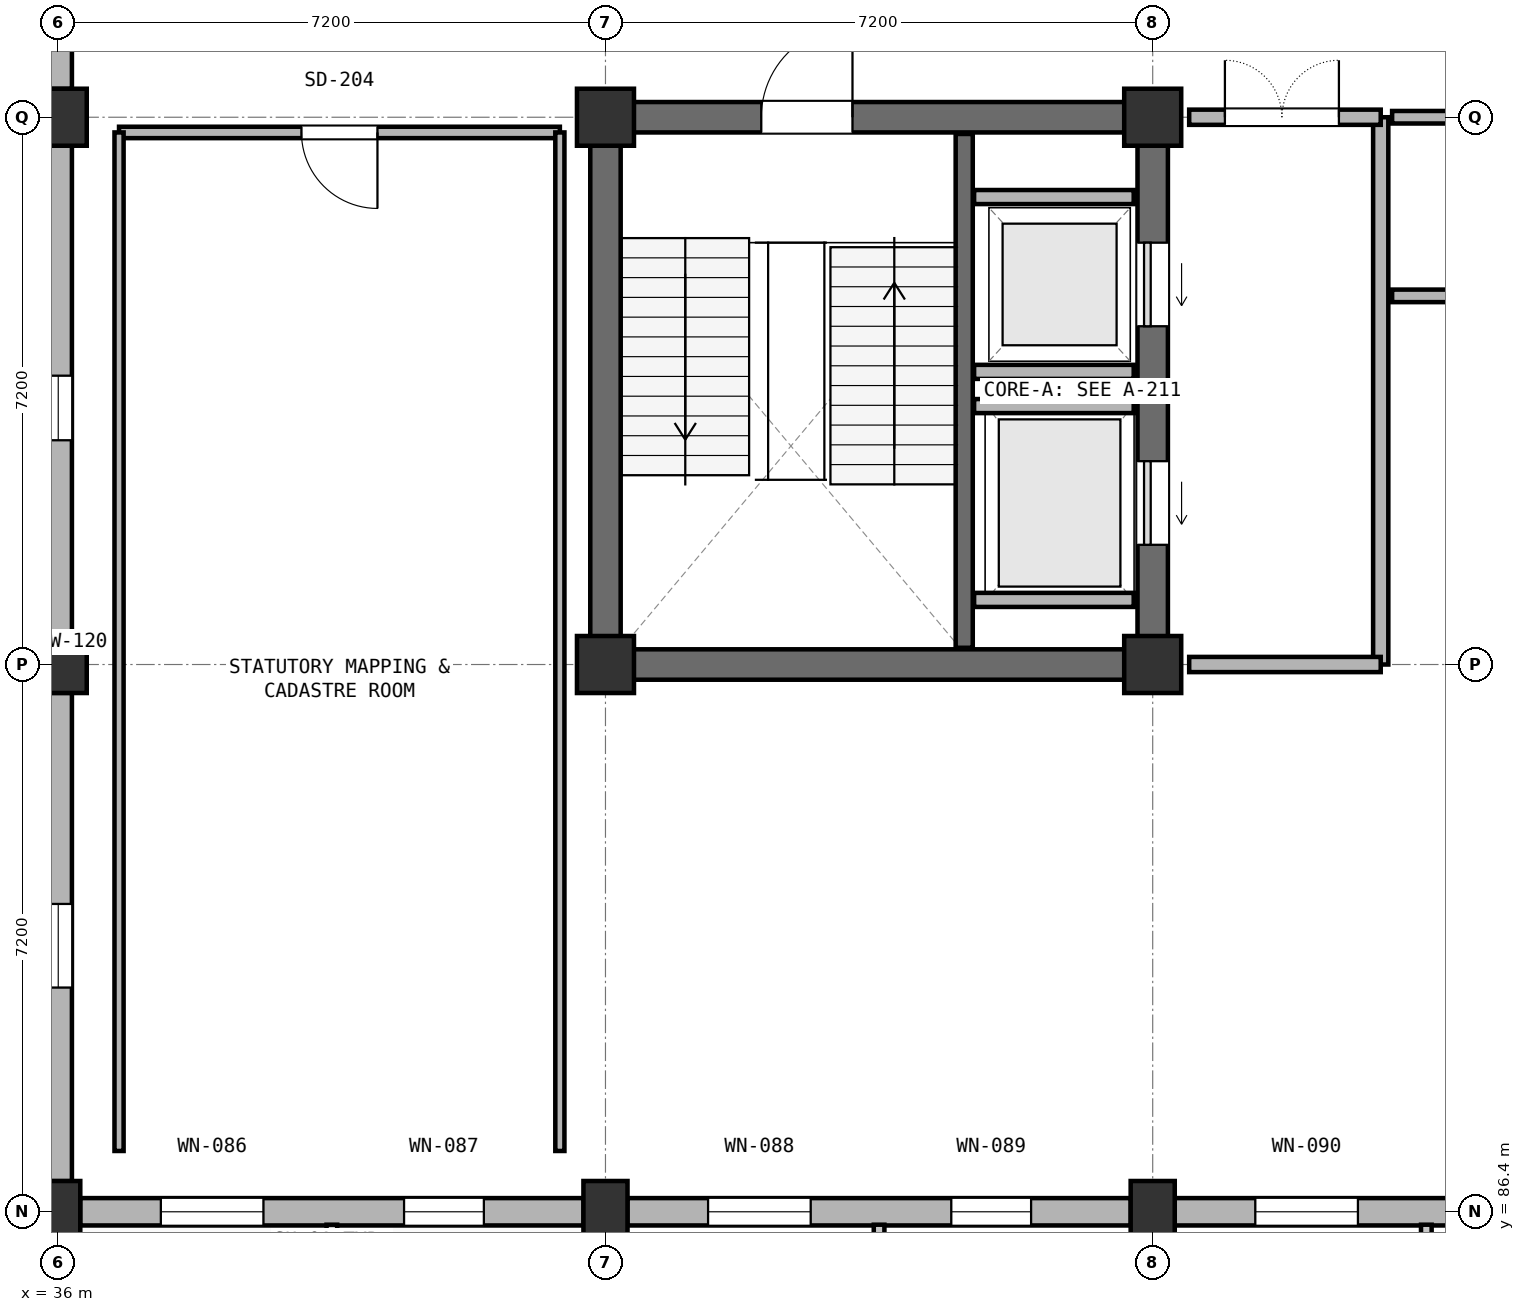
"""IFC4 building model, lengths in metres.
Left out: names, types, materials, properties, quantities, classifications, styles, units other than length and angle.
Written with IfcOpenShell. Run it as: python <this file> out.ifc"""

import sys

from ifc_helpers import new_model, si_unit, direction, frame, frame_2d, origin, origin_2d, place, context, subcontext, project, spatial, rectangle, extrude, element, fill, save


model = new_model("IFC4")
c1 = context("Model", 3, precision=1e-05, world=origin(), true_north=direction((0.0, 1.0)))
c2 = subcontext(c1, "Body", "Model", "MODEL_VIEW")
j1 = project(units=[si_unit("LENGTHUNIT", "METRE"), si_unit("PLANEANGLEUNIT", "RADIAN")], contexts=[c1])
p1 = place(None, origin())
s1 = spatial("IfcSite", under=j1, at=p1, CompositionType="ELEMENT")
p2 = place(p1, origin())
s2 = spatial("IfcBuilding", under=s1, at=p2, CompositionType="ELEMENT")
p3 = place(p2, frame((0.0, 0.0, 14.4)))
s3 = spatial("IfcBuildingStorey", under=s2, at=p3, CompositionType="ELEMENT", Elevation=14.4)
p4 = place(p3, frame((36.0, 86.4, 0.0), z_axis=(0.0, 0.0, 1.0), x_axis=(1.0, 0.0, 0.0)))
e1 = element("IfcColumn", 1, at=p4, inside=s3, PredefinedType="COLUMN", context=c2, shape_type="SweptSolid", body=[
    extrude(rectangle(XDim=0.58, YDim=0.81, at=origin_2d()), origin(), (0.0, 0.0, 1.0), 4.2),
])
for number, where, z_axis, x_axis in (
    (2, (36.0, 93.6, 0.0), (0.0, 0.0, 1.0), (1.0, 0.0, 0.0)),
    (3, (36.0, 100.8, 0.0), (0.0, 0.0, 1.0), (1.0, 0.0, 0.0)),
):
    element("IfcColumn", number, at=place(p3, frame(where, z_axis=z_axis, x_axis=x_axis)), inside=s3, PredefinedType="COLUMN", context=c2, shape_type="SweptSolid", body=[
        extrude(rectangle(XDim=0.75, YDim=0.75, at=origin_2d()), origin(), (0.0, 0.0, 1.0), 4.2),
    ])
p5 = place(p3, frame((43.2, 86.4, 0.0), z_axis=(0.0, 0.0, 1.0), x_axis=(1.0, 0.0, 0.0)))
e4 = element("IfcColumn", 4, at=p5, inside=s3, PredefinedType="COLUMN", context=c2, shape_type="SweptSolid", body=[
    extrude(rectangle(XDim=0.58, YDim=0.81, at=origin_2d()), origin(), (0.0, 0.0, 1.0), 4.2),
])
for number, where, z_axis, x_axis in (
    (5, (43.2, 93.6, 0.0), (0.0, 0.0, 1.0), (1.0, 0.0, 0.0)),
    (6, (43.2, 100.8, 0.0), (0.0, 0.0, 1.0), (1.0, 0.0, 0.0)),
):
    element("IfcColumn", number, at=place(p3, frame(where, z_axis=z_axis, x_axis=x_axis)), inside=s3, PredefinedType="COLUMN", context=c2, shape_type="SweptSolid", body=[
        extrude(rectangle(XDim=0.75, YDim=0.75, at=origin_2d()), origin(), (0.0, 0.0, 1.0), 4.2),
    ])
p6 = place(p3, frame((50.4, 86.4, 0.0), z_axis=(0.0, 0.0, 1.0), x_axis=(1.0, 0.0, 0.0)))
e7 = element("IfcColumn", 7, at=p6, inside=s3, PredefinedType="COLUMN", context=c2, shape_type="SweptSolid", body=[
    extrude(rectangle(XDim=0.58, YDim=0.81, at=origin_2d()), origin(), (0.0, 0.0, 1.0), 4.2),
])
for number, where, z_axis, x_axis in (
    (8, (50.4, 93.6, 0.0), (0.0, 0.0, 1.0), (1.0, 0.0, 0.0)),
    (9, (50.4, 100.8, 0.0), (0.0, 0.0, 1.0), (1.0, 0.0, 0.0)),
):
    element("IfcColumn", number, at=place(p3, frame(where, z_axis=z_axis, x_axis=x_axis)), inside=s3, PredefinedType="COLUMN", context=c2, shape_type="SweptSolid", body=[
        extrude(rectangle(XDim=0.75, YDim=0.75, at=origin_2d()), origin(), (0.0, 0.0, 1.0), 4.2),
    ])
p7 = place(p3, frame((43.55, 93.6, 0.0), z_axis=(0.0, 0.0, 1.0), x_axis=(1.0, 0.0, 0.0)))
e10 = element("IfcWall", 10, at=p7, inside=s3, PredefinedType="SHEAR", context=c2, shape_type="SweptSolid", body=[
    extrude(rectangle(XDim=6.5, YDim=0.4, at=frame_2d((3.25, 0.0))), origin(), (0.0, 0.0, 1.0), 4.2),
])
p8 = place(p3, frame((50.4, 93.95, 0.0), z_axis=(0.0, 0.0, 1.0), x_axis=(0.0, 1.0, 0.0)))
e11 = element("IfcWall", 11, at=p8, inside=s3, PredefinedType="SHEAR", context=c2, shape_type="SweptSolid", body=[
    extrude(rectangle(XDim=6.5, YDim=0.4, at=frame_2d((3.25, 0.0))), origin(), (0.0, 0.0, 1.0), 4.2),
])
p9 = place(p8, frame((1.225, 0.0, 0.0)))
e12 = element("IfcOpeningElement", 12, at=p9, cuts=e11, PredefinedType="OPENING", context=c2, shape_type="SweptSolid", body=[
    extrude(rectangle(XDim=1.1, YDim=2.2, at=frame_2d((0.55, 1.1))), frame((0.0, 0.21, 0.0), z_axis=(0.0, -1.0, 0.0), x_axis=(1.0, 0.0, 0.0)), (0.0, 0.0, 1.0), 0.42),
])
p10 = place(p8, frame((4.1, 0.0, 0.0)))
e13 = element("IfcOpeningElement", 13, at=p10, cuts=e11, PredefinedType="OPENING", context=c2, shape_type="SweptSolid", body=[
    extrude(rectangle(XDim=1.1, YDim=2.2, at=frame_2d((0.55, 1.1))), frame((0.0, 0.21, 0.0), z_axis=(0.0, -1.0, 0.0), x_axis=(1.0, 0.0, 0.0)), (0.0, 0.0, 1.0), 0.42),
])
p11 = place(p3, frame((50.05, 100.8, 0.0), z_axis=(0.0, 0.0, 1.0), x_axis=(-1.0, 0.0, 0.0)))
e14 = element("IfcWall", 14, at=p11, inside=s3, PredefinedType="SHEAR", context=c2, shape_type="SweptSolid", body=[
    extrude(rectangle(XDim=6.5, YDim=0.4, at=frame_2d((3.25, 0.0))), origin(), (0.0, 0.0, 1.0), 4.2),
])
p12 = place(p11, frame((3.6, 0.0, 0.0)))
e15 = element("IfcOpeningElement", 15, at=p12, cuts=e14, PredefinedType="OPENING", context=c2, shape_type="SweptSolid", body=[
    extrude(rectangle(XDim=1.2, YDim=2.2, at=frame_2d((0.6, 1.1))), frame((0.0, 0.21, 0.0), z_axis=(0.0, -1.0, 0.0), x_axis=(1.0, 0.0, 0.0)), (0.0, 0.0, 1.0), 0.42),
])
p13 = place(p3, frame((43.2, 100.45, 0.0), z_axis=(0.0, 0.0, 1.0), x_axis=(0.0, -1.0, 0.0)))
e16 = element("IfcWall", 16, at=p13, inside=s3, PredefinedType="SHEAR", context=c2, shape_type="SweptSolid", body=[
    extrude(rectangle(XDim=6.5, YDim=0.4, at=frame_2d((3.25, 0.0))), origin(), (0.0, 0.0, 1.0), 4.2),
])
p14 = place(p3, frame((47.92, 93.82, 0.0), z_axis=(0.0, 0.0, 1.0), x_axis=(0.0, 1.0, 0.0)))
e17 = element("IfcWall", 17, at=p14, inside=s3, PredefinedType="SHEAR", context=c2, shape_type="SweptSolid", body=[
    extrude(rectangle(XDim=6.76, YDim=0.225, at=frame_2d((3.38, 0.0))), origin(), (0.0, 0.0, 1.0), 4.2),
])
for number, where, z_axis, x_axis in (
    (18, (48.05, 94.45, 0.0), (0.0, 0.0, 1.0), (1.0, 0.0, 0.0)),
    (19, (48.05, 97.0, 0.0), (0.0, 0.0, 1.0), (1.0, 0.0, 0.0)),
    (20, (48.05, 97.45, 0.0), (0.0, 0.0, 1.0), (1.0, 0.0, 0.0)),
    (21, (48.05, 99.75, 0.0), (0.0, 0.0, 1.0), (1.0, 0.0, 0.0)),
):
    element("IfcWall", number, at=place(p3, frame(where, z_axis=z_axis, x_axis=x_axis)), inside=s3, PredefinedType="PARTITIONING", context=c2, shape_type="SweptSolid", body=[
        extrude(rectangle(XDim=2.1, YDim=0.185, at=frame_2d((1.05, 0.0))), origin(), (0.0, 0.0, 1.0), 4.2),
    ])
p15 = place(p3, frame((36.288, 86.4, 0.0), z_axis=(0.0, 0.0, 1.0), x_axis=(1.0, 0.0, 0.0)))
e22 = element("IfcWall", 22, at=p15, inside=s3, PredefinedType="SOLIDWALL", context=c2, shape_type="SweptSolid", body=[
    extrude(rectangle(XDim=6.624, YDim=0.36, at=frame_2d((3.312, 0.0))), origin(), (0.0, 0.0, 1.0), 3.04),
])
p16 = place(p15, frame((1.062, 0.0, 0.7)))
e23 = element("IfcOpeningElement", 23, at=p16, cuts=e22, PredefinedType="OPENING", context=c2, shape_type="SweptSolid", body=[
    extrude(rectangle(XDim=1.35, YDim=2.19, at=frame_2d((0.675, 1.095))), frame((0.0, 0.19, 0.0), z_axis=(0.0, -1.0, 0.0), x_axis=(1.0, 0.0, 0.0)), (0.0, 0.0, 1.0), 0.38),
])
p17 = place(p15, frame((4.262, 0.0, 0.7)))
e24 = element("IfcOpeningElement", 24, at=p17, cuts=e22, PredefinedType="OPENING", context=c2, shape_type="SweptSolid", body=[
    extrude(rectangle(XDim=1.05, YDim=2.19, at=frame_2d((0.525, 1.095))), frame((0.0, 0.19, 0.0), z_axis=(0.0, -1.0, 0.0), x_axis=(1.0, 0.0, 0.0)), (0.0, 0.0, 1.0), 0.38),
])
p18 = place(p3, frame((43.488, 86.4, 0.0), z_axis=(0.0, 0.0, 1.0), x_axis=(1.0, 0.0, 0.0)))
e25 = element("IfcWall", 25, at=p18, inside=s3, PredefinedType="SOLIDWALL", context=c2, shape_type="SweptSolid", body=[
    extrude(rectangle(XDim=6.624, YDim=0.36, at=frame_2d((3.312, 0.0))), origin(), (0.0, 0.0, 1.0), 3.04),
])
p19 = place(p18, frame((1.062, 0.0, 0.7)))
e26 = element("IfcOpeningElement", 26, at=p19, cuts=e25, PredefinedType="OPENING", context=c2, shape_type="SweptSolid", body=[
    extrude(rectangle(XDim=1.35, YDim=2.19, at=frame_2d((0.675, 1.095))), frame((0.0, 0.19, 0.0), z_axis=(0.0, -1.0, 0.0), x_axis=(1.0, 0.0, 0.0)), (0.0, 0.0, 1.0), 0.38),
])
p20 = place(p18, frame((4.262, 0.0, 0.7)))
e27 = element("IfcOpeningElement", 27, at=p20, cuts=e25, PredefinedType="OPENING", context=c2, shape_type="SweptSolid", body=[
    extrude(rectangle(XDim=1.05, YDim=2.19, at=frame_2d((0.525, 1.095))), frame((0.0, 0.19, 0.0), z_axis=(0.0, -1.0, 0.0), x_axis=(1.0, 0.0, 0.0)), (0.0, 0.0, 1.0), 0.38),
])
p21 = place(p3, frame((50.688, 86.4, 0.0), z_axis=(0.0, 0.0, 1.0), x_axis=(1.0, 0.0, 0.0)))
e28 = element("IfcWall", 28, at=p21, inside=s3, PredefinedType="SOLIDWALL", context=c2, shape_type="SweptSolid", body=[
    extrude(rectangle(XDim=6.624, YDim=0.36, at=frame_2d((3.312, 0.0))), origin(), (0.0, 0.0, 1.0), 3.04),
])
p22 = place(p21, frame((1.062, 0.0, 0.7)))
e29 = element("IfcOpeningElement", 29, at=p22, cuts=e28, PredefinedType="OPENING", context=c2, shape_type="SweptSolid", body=[
    extrude(rectangle(XDim=1.35, YDim=2.19, at=frame_2d((0.675, 1.095))), frame((0.0, 0.19, 0.0), z_axis=(0.0, -1.0, 0.0), x_axis=(1.0, 0.0, 0.0)), (0.0, 0.0, 1.0), 0.38),
])
p23 = place(p21, frame((4.262, 0.0, 0.7)))
e30 = element("IfcOpeningElement", 30, at=p23, cuts=e28, PredefinedType="OPENING", context=c2, shape_type="SweptSolid", body=[
    extrude(rectangle(XDim=1.05, YDim=2.19, at=frame_2d((0.525, 1.095))), frame((0.0, 0.19, 0.0), z_axis=(0.0, -1.0, 0.0), x_axis=(1.0, 0.0, 0.0)), (0.0, 0.0, 1.0), 0.38),
])
p24 = place(p3, frame((36.0, 86.803, 0.0), z_axis=(0.0, 0.0, 1.0), x_axis=(0.0, 1.0, 0.0)))
e31 = element("IfcWall", 31, at=p24, inside=s3, PredefinedType="SOLIDWALL", context=c2, shape_type="SweptSolid", body=[
    extrude(rectangle(XDim=6.424, YDim=0.36, at=frame_2d((3.212, 0.0))), origin(), (0.0, 0.0, 1.0), 3.04),
])
p25 = place(p24, frame((2.547, 0.0, 0.7)))
e32 = element("IfcOpeningElement", 32, at=p25, cuts=e31, PredefinedType="OPENING", context=c2, shape_type="SweptSolid", body=[
    extrude(rectangle(XDim=1.1, YDim=2.19, at=frame_2d((0.55, 1.095))), frame((0.0, 0.19, 0.0), z_axis=(0.0, -1.0, 0.0), x_axis=(1.0, 0.0, 0.0)), (0.0, 0.0, 1.0), 0.38),
])
p26 = place(p3, frame((36.0, 93.973, 0.0), z_axis=(0.0, 0.0, 1.0), x_axis=(0.0, 1.0, 0.0)))
e33 = element("IfcWall", 33, at=p26, inside=s3, PredefinedType="SOLIDWALL", context=c2, shape_type="SweptSolid", body=[
    extrude(rectangle(XDim=6.454, YDim=0.36, at=frame_2d((3.227, 0.0))), origin(), (0.0, 0.0, 1.0), 3.04),
])
p27 = place(p26, frame((2.577, 0.0, 0.7)))
e34 = element("IfcOpeningElement", 34, at=p27, cuts=e33, PredefinedType="OPENING", context=c2, shape_type="SweptSolid", body=[
    extrude(rectangle(XDim=0.85, YDim=2.19, at=frame_2d((0.425, 1.095))), frame((0.0, 0.19, 0.0), z_axis=(0.0, -1.0, 0.0), x_axis=(1.0, 0.0, 0.0)), (0.0, 0.0, 1.0), 0.38),
])
p28 = place(p3, frame((36.0, 101.173, 0.0), z_axis=(0.0, 0.0, 1.0), x_axis=(0.0, 1.0, 0.0)))
e35 = element("IfcWall", 35, at=p28, inside=s3, PredefinedType="SOLIDWALL", context=c2, shape_type="SweptSolid", body=[
    extrude(rectangle(XDim=6.454, YDim=0.36, at=frame_2d((3.227, 0.0))), origin(), (0.0, 0.0, 1.0), 3.04),
])
p29 = place(p28, frame((2.577, 0.0, 0.7)))
e36 = element("IfcOpeningElement", 36, at=p29, cuts=e35, PredefinedType="OPENING", context=c2, shape_type="SweptSolid", body=[
    extrude(rectangle(XDim=1.1, YDim=2.19, at=frame_2d((0.55, 1.095))), frame((0.0, 0.19, 0.0), z_axis=(0.0, -1.0, 0.0), x_axis=(1.0, 0.0, 0.0)), (0.0, 0.0, 1.0), 0.38),
])
p30 = place(p3, frame((53.4, 93.6, 0.0), z_axis=(0.0, 0.0, 1.0), x_axis=(0.0, 1.0, 0.0)))
e37 = element("IfcWall", 37, at=p30, inside=s3, PredefinedType="PARTITIONING", context=c2, shape_type="SweptSolid", body=[
    extrude(rectangle(XDim=7.2, YDim=0.2, at=frame_2d((3.6, 0.0))), origin(), (0.0, 0.0, 1.0), 3.08),
])
p31 = place(p3, frame((50.88, 93.6, 0.0), z_axis=(0.0, 0.0, 1.0), x_axis=(1.0, 0.0, 0.0)))
e38 = element("IfcWall", 38, at=p31, inside=s3, PredefinedType="PARTITIONING", context=c2, shape_type="SweptSolid", body=[
    extrude(rectangle(XDim=2.52, YDim=0.2, at=frame_2d((1.26, 0.0))), origin(), (0.0, 0.0, 1.0), 3.08),
])
p32 = place(p3, frame((53.4, 100.8, 0.0), z_axis=(0.0, 0.0, 1.0), x_axis=(-1.0, 0.0, 0.0)))
e39 = element("IfcWall", 39, at=p32, inside=s3, PredefinedType="PARTITIONING", context=c2, shape_type="SweptSolid", body=[
    extrude(rectangle(XDim=2.52, YDim=0.2, at=frame_2d((1.26, 0.0))), origin(), (0.0, 0.0, 1.0), 3.08),
])
p33 = place(p32, frame((0.55, 0.0, 0.0)))
e40 = element("IfcOpeningElement", 40, at=p33, cuts=e39, PredefinedType="OPENING", context=c2, shape_type="SweptSolid", body=[
    extrude(rectangle(XDim=1.5, YDim=2.2, at=frame_2d((0.75, 1.1))), frame((0.0, 0.11, 0.0), z_axis=(0.0, -1.0, 0.0), x_axis=(1.0, 0.0, 0.0)), (0.0, 0.0, 1.0), 0.22),
])
p34 = place(p3, frame((56.75, 100.8, 0.0), z_axis=(0.0, 0.0, 1.0), x_axis=(-1.0, 0.0, 0.0)))
e41 = element("IfcWall", 41, at=p34, inside=s3, PredefinedType="PARTITIONING", context=c2, shape_type="SweptSolid", body=[
    extrude(rectangle(XDim=3.2, YDim=0.165, at=frame_2d((1.6, 0.0))), origin(), (0.0, 0.0, 1.0), 3.08),
])
p35 = place(p34, frame((0.95, 0.0, 0.0)))
e42 = element("IfcOpeningElement", 42, at=p35, cuts=e41, PredefinedType="OPENING", context=c2, shape_type="SweptSolid", body=[
    extrude(rectangle(XDim=0.95, YDim=2.15, at=frame_2d((0.475, 1.075))), frame((0.0, 0.093, 0.0), z_axis=(0.0, -1.0, 0.0), x_axis=(1.0, 0.0, 0.0)), (0.0, 0.0, 1.0), 0.185),
])
p36 = place(p3, frame((53.55, 98.45, 0.0), z_axis=(0.0, 0.0, 1.0), x_axis=(1.0, 0.0, 0.0)))
e43 = element("IfcWall", 43, at=p36, inside=s3, PredefinedType="PARTITIONING", context=c2, shape_type="SweptSolid", body=[
    extrude(rectangle(XDim=3.2, YDim=0.165, at=frame_2d((1.6, 0.0))), origin(), (0.0, 0.0, 1.0), 3.08),
])
p37 = place(p3, frame((42.6, 100.6, 0.0), z_axis=(0.0, 0.0, 1.0), x_axis=(-1.0, 0.0, 0.0)))
e44 = element("IfcWall", 44, at=p37, inside=s3, PredefinedType="PARTITIONING", context=c2, shape_type="SweptSolid", body=[
    extrude(rectangle(XDim=5.8, YDim=0.15, at=frame_2d((2.9, 0.0))), origin(), (0.0, 0.0, 1.0), 3.08),
])
p38 = place(p37, frame((2.4, 0.0, 0.0)))
e45 = element("IfcOpeningElement", 45, at=p38, cuts=e44, PredefinedType="OPENING", context=c2, shape_type="SweptSolid", body=[
    extrude(rectangle(XDim=1.0, YDim=2.15, at=frame_2d((0.5, 1.075))), frame((0.0, 0.085, 0.0), z_axis=(0.0, -1.0, 0.0), x_axis=(1.0, 0.0, 0.0)), (0.0, 0.0, 1.0), 0.17),
])
for number, where, z_axis, x_axis in (
    (46, (36.8, 87.2, 0.0), (0.0, 0.0, 1.0), (0.0, 1.0, 0.0)),
    (47, (42.6, 100.6, 0.0), (0.0, 0.0, 1.0), (0.0, -1.0, 0.0)),
):
    element("IfcWall", number, at=place(p3, frame(where, z_axis=z_axis, x_axis=x_axis)), inside=s3, PredefinedType="PARTITIONING", context=c2, shape_type="SweptSolid", body=[
        extrude(rectangle(XDim=13.4, YDim=0.12, at=frame_2d((6.7, 0.0))), origin(), (0.0, 0.0, 1.0), 3.08),
    ])
p39 = place(p9, origin())
e48 = element("IfcDoor", 48, at=p39, inside=s3, OperationType="SLIDING_TO_LEFT", PredefinedType="DOOR", context=c2, shape_type="SweptSolid", body=[
    extrude(rectangle(XDim=1.1, YDim=2.2, at=frame_2d((0.55, 1.1))), frame((0.0, 0.025, 0.0), z_axis=(0.0, -1.0, 0.0), x_axis=(1.0, 0.0, 0.0)), (0.0, 0.0, 1.0), 0.05),
])
fill(e12, e48)
p40 = place(p10, origin())
e49 = element("IfcDoor", 49, at=p40, inside=s3, OperationType="SLIDING_TO_LEFT", PredefinedType="DOOR", context=c2, shape_type="SweptSolid", body=[
    extrude(rectangle(XDim=1.1, YDim=2.2, at=frame_2d((0.55, 1.1))), frame((0.0, 0.025, 0.0), z_axis=(0.0, -1.0, 0.0), x_axis=(1.0, 0.0, 0.0)), (0.0, 0.0, 1.0), 0.05),
])
fill(e13, e49)
p41 = place(p16, origin())
e50 = element("IfcWindow", 50, at=p41, inside=s3, PartitioningType="DOUBLE_PANEL_VERTICAL", PredefinedType="WINDOW", context=c2, shape_type="SweptSolid", body=[
    extrude(rectangle(XDim=1.35, YDim=2.19, at=frame_2d((0.675, 1.095))), frame((0.0, 0.03, 0.0), z_axis=(0.0, -1.0, 0.0), x_axis=(1.0, 0.0, 0.0)), (0.0, 0.0, 1.0), 0.06),
])
fill(e23, e50)
p42 = place(p17, origin())
e51 = element("IfcWindow", 51, at=p42, inside=s3, PartitioningType="SINGLE_PANEL", PredefinedType="WINDOW", context=c2, shape_type="SweptSolid", body=[
    extrude(rectangle(XDim=1.05, YDim=2.19, at=frame_2d((0.525, 1.095))), frame((0.0, 0.03, 0.0), z_axis=(0.0, -1.0, 0.0), x_axis=(1.0, 0.0, 0.0)), (0.0, 0.0, 1.0), 0.06),
])
fill(e24, e51)
p43 = place(p19, origin())
e52 = element("IfcWindow", 52, at=p43, inside=s3, PartitioningType="DOUBLE_PANEL_VERTICAL", PredefinedType="WINDOW", context=c2, shape_type="SweptSolid", body=[
    extrude(rectangle(XDim=1.35, YDim=2.19, at=frame_2d((0.675, 1.095))), frame((0.0, 0.03, 0.0), z_axis=(0.0, -1.0, 0.0), x_axis=(1.0, 0.0, 0.0)), (0.0, 0.0, 1.0), 0.06),
])
fill(e26, e52)
p44 = place(p20, origin())
e53 = element("IfcWindow", 53, at=p44, inside=s3, PartitioningType="SINGLE_PANEL", PredefinedType="WINDOW", context=c2, shape_type="SweptSolid", body=[
    extrude(rectangle(XDim=1.05, YDim=2.19, at=frame_2d((0.525, 1.095))), frame((0.0, 0.03, 0.0), z_axis=(0.0, -1.0, 0.0), x_axis=(1.0, 0.0, 0.0)), (0.0, 0.0, 1.0), 0.06),
])
fill(e27, e53)
p45 = place(p22, origin())
e54 = element("IfcWindow", 54, at=p45, inside=s3, PartitioningType="DOUBLE_PANEL_VERTICAL", PredefinedType="WINDOW", context=c2, shape_type="SweptSolid", body=[
    extrude(rectangle(XDim=1.35, YDim=2.19, at=frame_2d((0.675, 1.095))), frame((0.0, 0.03, 0.0), z_axis=(0.0, -1.0, 0.0), x_axis=(1.0, 0.0, 0.0)), (0.0, 0.0, 1.0), 0.06),
])
fill(e29, e54)
p46 = place(p25, origin())
e55 = element("IfcWindow", 55, at=p46, inside=s3, PartitioningType="SINGLE_PANEL", PredefinedType="WINDOW", context=c2, shape_type="SweptSolid", body=[
    extrude(rectangle(XDim=1.1, YDim=2.19, at=frame_2d((0.55, 1.095))), frame((0.0, 0.03, 0.0), z_axis=(0.0, -1.0, 0.0), x_axis=(1.0, 0.0, 0.0)), (0.0, 0.0, 1.0), 0.06),
])
fill(e32, e55)
p47 = place(p27, origin())
e56 = element("IfcWindow", 56, at=p47, inside=s3, PartitioningType="SINGLE_PANEL", PredefinedType="WINDOW", context=c2, shape_type="SweptSolid", body=[
    extrude(rectangle(XDim=0.85, YDim=2.19, at=frame_2d((0.425, 1.095))), frame((0.0, 0.03, 0.0), z_axis=(0.0, -1.0, 0.0), x_axis=(1.0, 0.0, 0.0)), (0.0, 0.0, 1.0), 0.06),
])
fill(e34, e56)
p48 = place(p12, frame((1.2, 0.0, 0.0), z_axis=(0.0, 0.0, 1.0), x_axis=(-1.0, 0.0, 0.0)))
e57 = element("IfcDoor", 57, at=p48, inside=s3, OperationType="SINGLE_SWING_RIGHT", PredefinedType="DOOR", context=c2, shape_type="SweptSolid", body=[
    extrude(rectangle(XDim=1.2, YDim=2.2, at=frame_2d((0.6, 1.1))), frame((0.0, 0.025, 0.0), z_axis=(0.0, -1.0, 0.0), x_axis=(1.0, 0.0, 0.0)), (0.0, 0.0, 1.0), 0.05),
])
fill(e15, e57)
p49 = place(p33, frame((1.5, 0.0, 0.0), z_axis=(0.0, 0.0, 1.0), x_axis=(-1.0, 0.0, 0.0)))
e58 = element("IfcDoor", 58, at=p49, inside=s3, OperationType="DOUBLE_DOOR_SINGLE_SWING", PredefinedType="DOOR", context=c2, shape_type="SweptSolid", body=[
    extrude(rectangle(XDim=1.5, YDim=2.2, at=frame_2d((0.75, 1.1))), frame((0.0, 0.025, 0.0), z_axis=(0.0, -1.0, 0.0), x_axis=(1.0, 0.0, 0.0)), (0.0, 0.0, 1.0), 0.05),
])
fill(e40, e58)
p50 = place(p38, origin())
e59 = element("IfcDoor", 59, at=p50, inside=s3, OperationType="SINGLE_SWING_LEFT", PredefinedType="DOOR", context=c2, shape_type="SweptSolid", body=[
    extrude(rectangle(XDim=1.0, YDim=2.15, at=frame_2d((0.5, 1.075))), frame((0.0, 0.025, 0.0), z_axis=(0.0, -1.0, 0.0), x_axis=(1.0, 0.0, 0.0)), (0.0, 0.0, 1.0), 0.05),
])
fill(e45, e59)
save(model, sys.argv[1])
